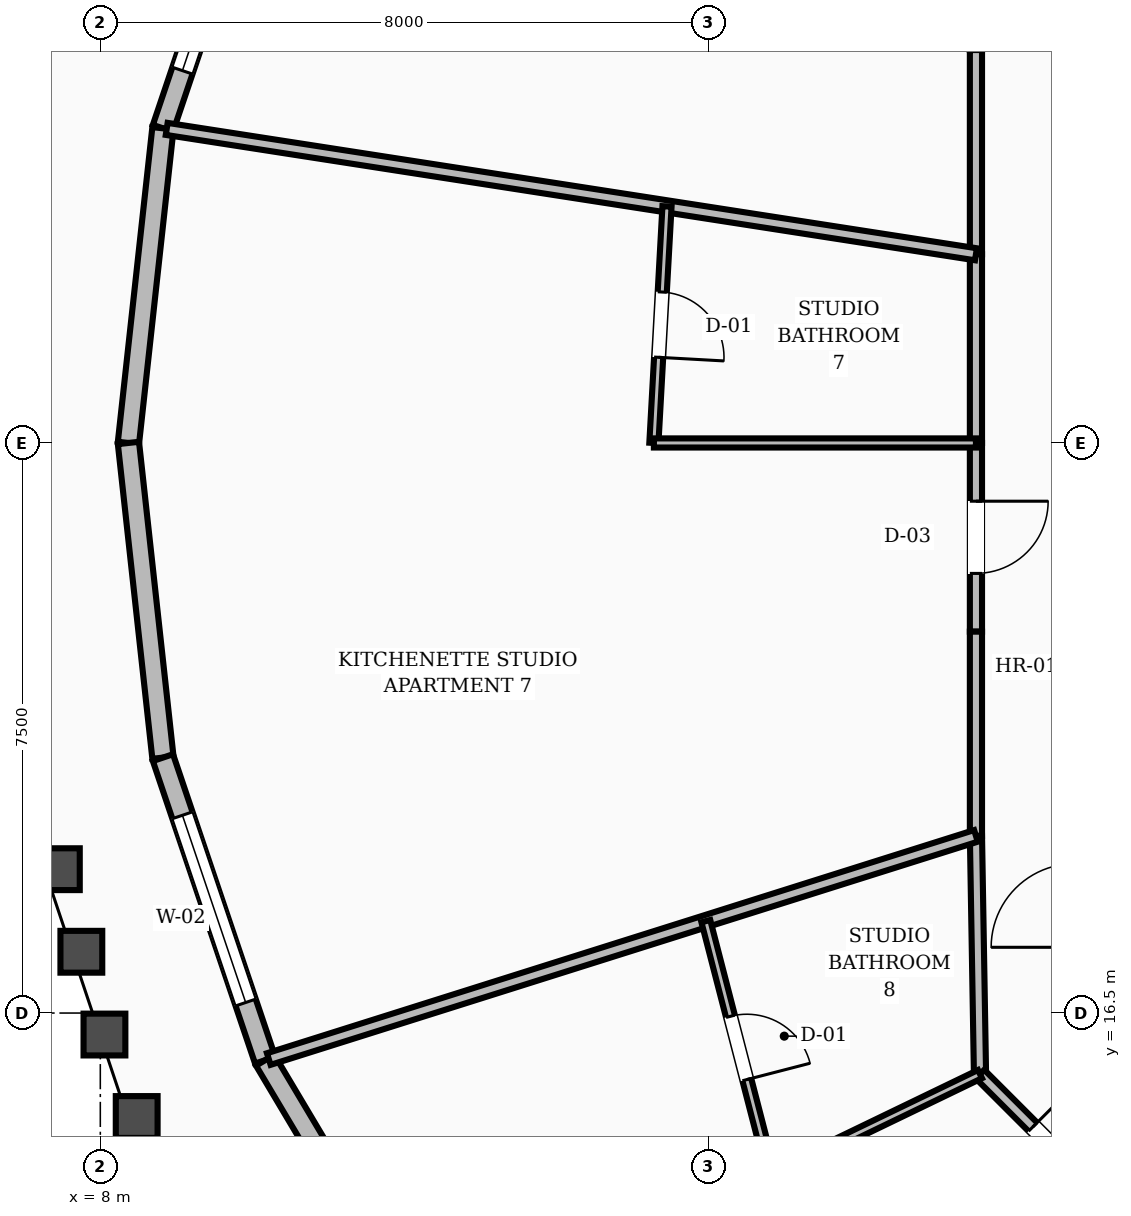
"""IFC4 building model, lengths in metres.
Left out: names, types, materials, properties, quantities, classifications, styles, units other than length and angle.
Written with IfcOpenShell. Run it as: python <this file> out.ifc"""

import sys

from ifc_helpers import new_model, si_unit, direction, frame, frame_2d, origin, place, context, subcontext, project, spatial, rectangle, extrude, element, fill, save


model = new_model("IFC4")
c1 = context("Model", 3, precision=1e-05, world=origin(), true_north=direction((0.0, 1.0)))
c2 = subcontext(c1, "Body", "Model", "MODEL_VIEW")
j1 = project(units=[si_unit("LENGTHUNIT", "METRE"), si_unit("PLANEANGLEUNIT", "RADIAN")], contexts=[c1])
p1 = place(None, origin())
s1 = spatial("IfcSite", under=j1, at=p1, CompositionType="ELEMENT")
p2 = place(p1, origin())
s2 = spatial("IfcBuilding", under=s1, at=p2, CompositionType="ELEMENT")
p3 = place(p2, frame((0.0, 0.0, 214.8)))
s3 = spatial("IfcBuildingStorey", under=s2, at=p3, CompositionType="ELEMENT", Elevation=214.8)
p4 = place(p3, frame((10.169, 32.12, 0.0), z_axis=(0.0, 0.0, 1.0), x_axis=(-0.320060327551, -0.947397164197, 0.0)))
e1 = element("IfcWall", 1, at=p4, inside=s3, PredefinedType="STANDARD", context=c2, shape_type="SweptSolid", body=[
    extrude(rectangle(XDim=4.201, YDim=0.28, at=frame_2d((2.101, 0.0))), origin(), (0.0, 0.0, 1.0), 2.88),
])
p5 = place(p4, frame((0.801, 0.0, 0.8)))
e2 = element("IfcOpeningElement", 2, at=p5, cuts=e1, PredefinedType="OPENING", context=c2, shape_type="SweptSolid", body=[
    extrude(rectangle(XDim=2.6, YDim=1.65, at=frame_2d((1.3, 0.825))), frame((0.0, 0.15, 0.0), z_axis=(0.0, -1.0, 0.0), x_axis=(1.0, 0.0, 0.0)), (0.0, 0.0, 1.0), 0.3),
])
for number, where, z_axis, x_axis in (
    (3, (8.824, 28.14, 0.0), (0.0, 0.0, 1.0), (-0.109, -0.994, 0.0)),
    (4, (8.37, 24.0, 0.0), (0.0, 0.0, 1.0), (0.109, -0.994, 0.0)),
):
    element("IfcWall", number, at=place(p3, frame(where, z_axis=z_axis, x_axis=x_axis)), inside=s3, PredefinedType="STANDARD", context=c2, shape_type="SweptSolid", body=[
        extrude(rectangle(XDim=4.165, YDim=0.28, at=frame_2d((2.082, 0.0))), origin(), (0.0, 0.0, 1.0), 2.88),
    ])
p6 = place(p3, frame((8.824, 19.86, 0.0), z_axis=(0.0, 0.0, 1.0), x_axis=(0.320060327551, -0.947397164197, 0.0)))
e5 = element("IfcWall", 5, at=p6, inside=s3, PredefinedType="STANDARD", context=c2, shape_type="SweptSolid", body=[
    extrude(rectangle(XDim=4.201, YDim=0.28, at=frame_2d((2.101, 0.0))), origin(), (0.0, 0.0, 1.0), 2.88),
])
p7 = place(p6, frame((0.801, 0.0, 0.8)))
e6 = element("IfcOpeningElement", 6, at=p7, cuts=e5, PredefinedType="OPENING", context=c2, shape_type="SweptSolid", body=[
    extrude(rectangle(XDim=2.6, YDim=1.65, at=frame_2d((1.3, 0.825))), frame((0.0, 0.15, 0.0), z_axis=(0.0, -1.0, 0.0), x_axis=(1.0, 0.0, 0.0)), (0.0, 0.0, 1.0), 0.3),
])
p8 = place(p3, frame((10.169, 15.88, 0.0), z_axis=(0.0, 0.0, 1.0), x_axis=(0.511481849, -0.859294081292, 0.0)))
e7 = element("IfcWall", 7, at=p8, inside=s3, PredefinedType="STANDARD", context=c2, shape_type="SweptSolid", body=[
    extrude(rectangle(XDim=4.269, YDim=0.28, at=frame_2d((2.135, 0.0))), origin(), (0.0, 0.0, 1.0), 2.88),
])
p9 = place(p3, frame((19.52, 29.169, 0.0), z_axis=(0.0, 0.0, 1.0), x_axis=(0.0, -1.0, 0.0)))
e8 = element("IfcWall", 8, at=p9, inside=s3, PredefinedType="SOLIDWALL", context=c2, shape_type="SweptSolid", body=[
    extrude(rectangle(XDim=2.687, YDim=0.16, at=frame_2d((1.344, 0.0))), origin(), (0.0, 0.0, 1.0), 2.87),
])
p10 = place(p3, frame((19.52, 26.482, 0.0), z_axis=(0.0, 0.0, 1.0), x_axis=(0.0, -1.0, 0.0)))
e9 = element("IfcWall", 9, at=p10, inside=s3, PredefinedType="SOLIDWALL", context=c2, shape_type="SweptSolid", body=[
    extrude(rectangle(XDim=2.482, YDim=0.16, at=frame_2d((1.241, 0.0))), origin(), (0.0, 0.0, 1.0), 2.87),
])
p11 = place(p3, frame((19.52, 24.0, 0.0), z_axis=(0.0, 0.0, 1.0), x_axis=(0.0, -1.0, 0.0)))
e10 = element("IfcWall", 10, at=p11, inside=s3, PredefinedType="SOLIDWALL", context=c2, shape_type="SweptSolid", body=[
    extrude(rectangle(XDim=2.482, YDim=0.16, at=frame_2d((1.241, 0.0))), origin(), (0.0, 0.0, 1.0), 2.87),
])
p12 = place(p11, frame((0.766, 0.0, 0.0)))
e11 = element("IfcOpeningElement", 11, at=p12, cuts=e10, PredefinedType="OPENING", context=c2, shape_type="SweptSolid", body=[
    extrude(rectangle(XDim=0.95, YDim=2.1, at=frame_2d((0.475, 1.05))), frame((0.0, 0.09, 0.0), z_axis=(0.0, -1.0, 0.0), x_axis=(1.0, 0.0, 0.0)), (0.0, 0.0, 1.0), 0.18),
])
p13 = place(p3, frame((19.52, 21.518, 0.0), z_axis=(0.0, 0.0, 1.0), x_axis=(0.0, -1.0, 0.0)))
e12 = element("IfcWall", 12, at=p13, inside=s3, PredefinedType="SOLIDWALL", context=c2, shape_type="SweptSolid", body=[
    extrude(rectangle(XDim=2.687, YDim=0.16, at=frame_2d((1.344, 0.0))), origin(), (0.0, 0.0, 1.0), 2.87),
])
p14 = place(p3, frame((19.52, 18.831, 0.0), z_axis=(0.0, 0.0, 1.0), x_axis=(0.016981035134, -0.999855811828, 0.0)))
e13 = element("IfcWall", 13, at=p14, inside=s3, PredefinedType="SOLIDWALL", context=c2, shape_type="SweptSolid", body=[
    extrude(rectangle(XDim=3.134, YDim=0.16, at=frame_2d((1.567, 0.0))), origin(), (0.0, 0.0, 1.0), 2.87),
])
p15 = place(p3, frame((19.573, 15.697, 0.0), z_axis=(0.0, 0.0, 1.0), x_axis=(0.707106781187, -0.707106781187, 0.0)))
e14 = element("IfcWall", 14, at=p15, inside=s3, PredefinedType="SOLIDWALL", context=c2, shape_type="SweptSolid", body=[
    extrude(rectangle(XDim=2.916, YDim=0.16, at=frame_2d((1.458, 0.0))), origin(), (0.0, 0.0, 1.0), 2.87),
])
p16 = place(p15, frame((0.983, 0.0, 0.0)))
e15 = element("IfcOpeningElement", 15, at=p16, cuts=e14, PredefinedType="OPENING", context=c2, shape_type="SweptSolid", body=[
    extrude(rectangle(XDim=0.95, YDim=2.1, at=frame_2d((0.475, 1.05))), frame((0.0, 0.09, 0.0), z_axis=(0.0, -1.0, 0.0), x_axis=(1.0, 0.0, 0.0)), (0.0, 0.0, 1.0), 0.18),
])
p17 = place(p3, frame((19.52, 26.482, 0.0), z_axis=(0.0, 0.0, 1.0), x_axis=(-0.988211347905, 0.15309582578, 0.0)))
e16 = element("IfcWall", 16, at=p17, inside=s3, PredefinedType="SOLIDWALL", context=c2, shape_type="SweptSolid", body=[
    extrude(rectangle(XDim=10.774, YDim=0.16, at=frame_2d((5.387, 0.0))), origin(), (0.0, 0.0, 1.0), 2.87),
])
p18 = place(p3, frame((15.456, 27.112, 0.0), z_axis=(0.0, 0.0, 1.0), x_axis=(-0.055378916224, -0.998465410336, 0.0)))
e17 = element("IfcWall", 17, at=p18, inside=s3, PredefinedType="PARTITIONING", context=c2, shape_type="SweptSolid", body=[
    extrude(rectangle(XDim=3.117, YDim=0.12, at=frame_2d((1.559, 0.0))), origin(), (0.0, 0.0, 1.0), 2.87),
])
p19 = place(p18, frame((1.128, 0.0, 0.0)))
e18 = element("IfcOpeningElement", 18, at=p19, cuts=e17, PredefinedType="OPENING", context=c2, shape_type="SweptSolid", body=[
    extrude(rectangle(XDim=0.86, YDim=2.1, at=frame_2d((0.43, 1.05))), frame((0.0, 0.07, 0.0), z_axis=(0.0, -1.0, 0.0), x_axis=(1.0, 0.0, 0.0)), (0.0, 0.0, 1.0), 0.14),
])
p20 = place(p3, frame((19.52, 24.0, 0.0), z_axis=(0.0, 0.0, 1.0), x_axis=(-1.0, 0.0, 0.0)))
e19 = element("IfcWall", 19, at=p20, inside=s3, PredefinedType="PARTITIONING", context=c2, shape_type="SweptSolid", body=[
    extrude(rectangle(XDim=4.237, YDim=0.12, at=frame_2d((2.119, 0.0))), origin(), (0.0, 0.0, 1.0), 2.87),
])
p21 = place(p3, frame((19.52, 18.831, 0.0), z_axis=(0.0, 0.0, 1.0), x_axis=(-0.953655254227, -0.300901405921, 0.0)))
e20 = element("IfcWall", 20, at=p21, inside=s3, PredefinedType="SOLIDWALL", context=c2, shape_type="SweptSolid", body=[
    extrude(rectangle(XDim=9.756, YDim=0.16, at=frame_2d((4.878, 0.0))), origin(), (0.0, 0.0, 1.0), 2.87),
])
p22 = place(p3, frame((15.967, 17.709, 0.0), z_axis=(0.0, 0.0, 1.0), x_axis=(0.250327875267, -0.968161120302, 0.0)))
e21 = element("IfcWall", 21, at=p22, inside=s3, PredefinedType="PARTITIONING", context=c2, shape_type="SweptSolid", body=[
    extrude(rectangle(XDim=3.447, YDim=0.12, at=frame_2d((1.723, 0.0))), origin(), (0.0, 0.0, 1.0), 2.87),
])
p23 = place(p22, frame((1.293, 0.0, 0.0)))
e22 = element("IfcOpeningElement", 22, at=p23, cuts=e21, PredefinedType="OPENING", context=c2, shape_type="SweptSolid", body=[
    extrude(rectangle(XDim=0.86, YDim=2.1, at=frame_2d((0.43, 1.05))), frame((0.0, 0.07, 0.0), z_axis=(0.0, -1.0, 0.0), x_axis=(1.0, 0.0, 0.0)), (0.0, 0.0, 1.0), 0.14),
])
p24 = place(p3, frame((19.573, 15.697, 0.0), z_axis=(0.0, 0.0, 1.0), x_axis=(-0.900574352632, -0.434702007565, 0.0)))
e23 = element("IfcWall", 23, at=p24, inside=s3, PredefinedType="PARTITIONING", context=c2, shape_type="SweptSolid", body=[
    extrude(rectangle(XDim=3.047, YDim=0.12, at=frame_2d((1.523, 0.0))), origin(), (0.0, 0.0, 1.0), 2.87),
])
p25 = place(p5, origin())
e24 = element("IfcWindow", 24, at=p25, inside=s3, PartitioningType="SINGLE_PANEL", PredefinedType="WINDOW", context=c2, shape_type="SweptSolid", body=[
    extrude(rectangle(XDim=2.6, YDim=1.65, at=frame_2d((1.3, 0.825))), frame((0.0, 0.03, 0.0), z_axis=(0.0, -1.0, 0.0), x_axis=(1.0, 0.0, 0.0)), (0.0, 0.0, 1.0), 0.06),
])
fill(e2, e24)
p26 = place(p7, origin())
e25 = element("IfcWindow", 25, at=p26, inside=s3, PartitioningType="SINGLE_PANEL", PredefinedType="WINDOW", context=c2, shape_type="SweptSolid", body=[
    extrude(rectangle(XDim=2.6, YDim=1.65, at=frame_2d((1.3, 0.825))), frame((0.0, 0.03, 0.0), z_axis=(0.0, -1.0, 0.0), x_axis=(1.0, 0.0, 0.0)), (0.0, 0.0, 1.0), 0.06),
])
fill(e6, e25)
p27 = place(p19, origin())
e26 = element("IfcDoor", 26, at=p27, inside=s3, OperationType="SINGLE_SWING_RIGHT", PredefinedType="DOOR", context=c2, shape_type="SweptSolid", body=[
    extrude(rectangle(XDim=0.86, YDim=2.1, at=frame_2d((0.43, 1.05))), frame((0.0, 0.025, 0.0), z_axis=(0.0, -1.0, 0.0), x_axis=(1.0, 0.0, 0.0)), (0.0, 0.0, 1.0), 0.05),
])
fill(e18, e26)
p28 = place(p12, origin())
e27 = element("IfcDoor", 27, at=p28, inside=s3, OperationType="SINGLE_SWING_LEFT", PredefinedType="DOOR", context=c2, shape_type="SweptSolid", body=[
    extrude(rectangle(XDim=0.95, YDim=2.1, at=frame_2d((0.475, 1.05))), frame((0.0, 0.025, 0.0), z_axis=(0.0, -1.0, 0.0), x_axis=(1.0, 0.0, 0.0)), (0.0, 0.0, 1.0), 0.05),
])
fill(e11, e27)
p29 = place(p23, origin())
e28 = element("IfcDoor", 28, at=p29, inside=s3, OperationType="SINGLE_SWING_RIGHT", PredefinedType="DOOR", context=c2, shape_type="SweptSolid", body=[
    extrude(rectangle(XDim=0.86, YDim=2.1, at=frame_2d((0.43, 1.05))), frame((0.0, 0.025, 0.0), z_axis=(0.0, -1.0, 0.0), x_axis=(1.0, 0.0, 0.0)), (0.0, 0.0, 1.0), 0.05),
])
fill(e22, e28)
p30 = place(p16, origin())
e29 = element("IfcDoor", 29, at=p30, inside=s3, OperationType="SINGLE_SWING_LEFT", PredefinedType="DOOR", context=c2, shape_type="SweptSolid", body=[
    extrude(rectangle(XDim=0.95, YDim=2.1, at=frame_2d((0.475, 1.05))), frame((0.0, 0.025, 0.0), z_axis=(0.0, -1.0, 0.0), x_axis=(1.0, 0.0, 0.0)), (0.0, 0.0, 1.0), 0.05),
])
fill(e15, e29)
save(model, sys.argv[1])
